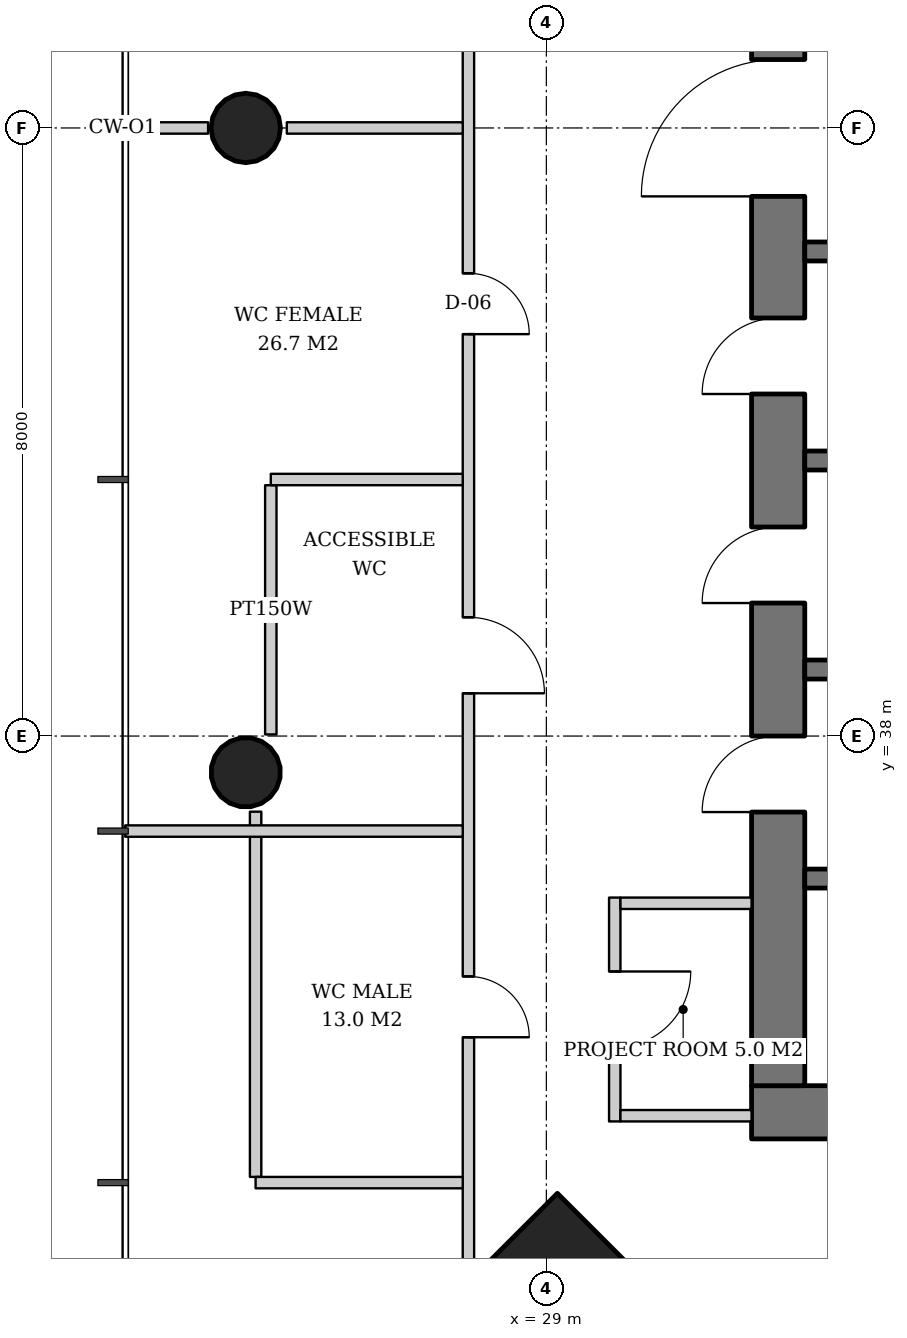
"""IFC4 building model, lengths in metres.
Left out: names, types, materials, properties, quantities, classifications, styles, units other than length and angle.
Written with IfcOpenShell. Run it as: python <this file> out.ifc"""

import sys

from ifc_helpers import new_model, si_unit, direction, frame, frame_2d, origin, origin_2d, place, context, subcontext, project, spatial, rectangle, hollow_circle, extrude, element, fill, save


model = new_model("IFC4")
c1 = context("Model", 3, precision=1e-05, world=origin(), true_north=direction((0.0, 1.0)))
c2 = subcontext(c1, "Body", "Model", "MODEL_VIEW")
j1 = project(units=[si_unit("LENGTHUNIT", "METRE"), si_unit("PLANEANGLEUNIT", "RADIAN")], contexts=[c1])
p1 = place(None, origin())
s1 = spatial("IfcSite", under=j1, at=p1, CompositionType="ELEMENT")
p2 = place(p1, origin())
s2 = spatial("IfcBuilding", under=s1, at=p2, CompositionType="ELEMENT")
p3 = place(p2, frame((0.0, 0.0, 146.4)))
s3 = spatial("IfcBuildingStorey", under=s2, at=p3, CompositionType="ELEMENT", Elevation=146.4)
p4 = place(p3, frame((29.107, 30.107, 0.0), z_axis=(0.031898107953, 0.031898107953, 0.998981992539), x_axis=(-0.707106781187, 0.707106781187, 0.0)))
e1 = element("IfcColumn", 1, at=p4, inside=s3, PredefinedType="COLUMN", context=c2, shape_type="SweptSolid", body=[
    extrude(rectangle(XDim=2.6, YDim=2.6, at=origin_2d()), origin(), (0.0, 0.0, 1.0), 3.804),
])
p5 = place(p3, frame((25.007, 46.0, 0.0), z_axis=(0.031978496719, 0.0, 0.999488557087), x_axis=(0.0, 1.0, 0.0)))
e2 = element("IfcColumn", 2, at=p5, inside=s3, PredefinedType="COLUMN", context=c2, shape_type="SweptSolid", body=[
    extrude(hollow_circle(Radius=0.457, WallThickness=0.03, at=origin_2d()), origin(), (0.0, 0.0, 1.0), 3.802),
])
p6 = place(p3, frame((25.007, 37.504, 0.0), z_axis=(0.031974442509, 0.015923015547, 0.999361842679), x_axis=(-0.445775033553, 0.895145027055, 0.0)))
e3 = element("IfcColumn", 3, at=p6, inside=s3, PredefinedType="COLUMN", context=c2, shape_type="SweptSolid", body=[
    extrude(hollow_circle(Radius=0.457, WallThickness=0.03, at=origin_2d()), origin(), (0.0, 0.0, 1.0), 3.802),
])
p7 = place(p3, frame((31.7, 33.05, 0.0), z_axis=(0.0, 0.0, 1.0), x_axis=(1.0, 0.0, 0.0)))
e4 = element("IfcWall", 4, at=p7, inside=s3, PredefinedType="SHEAR", context=c2, shape_type="SweptSolid", body=[
    extrude(rectangle(XDim=26.6, YDim=0.7, at=frame_2d((13.3, 0.0))), origin(), (0.0, 0.0, 1.0), 3.8),
])
p8 = place(p7, frame((7.3, 0.0, 0.0)))
e5 = element("IfcOpeningElement", 5, at=p8, cuts=e4, PredefinedType="OPENING", context=c2, shape_type="SweptSolid", body=[
    extrude(rectangle(XDim=1.0, YDim=2.1, at=frame_2d((0.5, 1.05))), frame((0.0, 0.36, 0.0), z_axis=(0.0, -1.0, 0.0), x_axis=(1.0, 0.0, 0.0)), (0.0, 0.0, 1.0), 0.72),
])
p9 = place(p7, frame((18.75, 0.0, 0.0)))
e6 = element("IfcOpeningElement", 6, at=p9, cuts=e4, PredefinedType="OPENING", context=c2, shape_type="SweptSolid", body=[
    extrude(rectangle(XDim=1.0, YDim=2.1, at=frame_2d((0.5, 1.05))), frame((0.0, 0.36, 0.0), z_axis=(0.0, -1.0, 0.0), x_axis=(1.0, 0.0, 0.0)), (0.0, 0.0, 1.0), 0.72),
])
p10 = place(p7, frame((3.2, 0.0, 0.0)))
e7 = element("IfcOpeningElement", 7, at=p10, cuts=e4, PredefinedType="OPENING", context=c2, shape_type="SweptSolid", body=[
    extrude(rectangle(XDim=1.0, YDim=2.1, at=frame_2d((0.5, 1.05))), frame((0.0, 0.36, 0.0), z_axis=(0.0, -1.0, 0.0), x_axis=(1.0, 0.0, 0.0)), (0.0, 0.0, 1.0), 0.72),
])
p11 = place(p7, frame((10.42, 0.0, 0.0)))
e8 = element("IfcOpeningElement", 8, at=p11, cuts=e4, PredefinedType="OPENING", context=c2, shape_type="SweptSolid", body=[
    extrude(rectangle(XDim=1.0, YDim=2.1, at=frame_2d((0.5, 1.05))), frame((0.0, 0.36, 0.0), z_axis=(0.0, -1.0, 0.0), x_axis=(1.0, 0.0, 0.0)), (0.0, 0.0, 1.0), 0.72),
])
p12 = place(p7, frame((14.46, 0.0, 0.0)))
e9 = element("IfcOpeningElement", 9, at=p12, cuts=e4, PredefinedType="OPENING", context=c2, shape_type="SweptSolid", body=[
    extrude(rectangle(XDim=1.0, YDim=2.1, at=frame_2d((0.5, 1.05))), frame((0.0, 0.36, 0.0), z_axis=(0.0, -1.0, 0.0), x_axis=(1.0, 0.0, 0.0)), (0.0, 0.0, 1.0), 0.72),
])
p13 = place(p7, frame((22.5, 0.0, 0.0)))
e10 = element("IfcOpeningElement", 10, at=p13, cuts=e4, PredefinedType="OPENING", context=c2, shape_type="SweptSolid", body=[
    extrude(rectangle(XDim=1.0, YDim=2.1, at=frame_2d((0.5, 1.05))), frame((0.0, 0.36, 0.0), z_axis=(0.0, -1.0, 0.0), x_axis=(1.0, 0.0, 0.0)), (0.0, 0.0, 1.0), 0.72),
])
p14 = place(p3, frame((32.05, 33.4, 0.0), z_axis=(0.0, 0.0, 1.0), x_axis=(0.0, 1.0, 0.0)))
e11 = element("IfcWall", 11, at=p14, inside=s3, PredefinedType="SHEAR", context=c2, shape_type="SweptSolid", body=[
    extrude(rectangle(XDim=25.2, YDim=0.7, at=frame_2d((12.6, 0.0))), origin(), (0.0, 0.0, 1.0), 3.8),
])
p15 = place(p14, frame((11.7, 0.0, 0.0)))
e12 = element("IfcOpeningElement", 12, at=p15, cuts=e11, PredefinedType="OPENING", context=c2, shape_type="SweptSolid", body=[
    extrude(rectangle(XDim=1.8, YDim=2.4, at=frame_2d((0.9, 1.2))), frame((0.0, 0.36, 0.0), z_axis=(0.0, -1.0, 0.0), x_axis=(1.0, 0.0, 0.0)), (0.0, 0.0, 1.0), 0.72),
])
p16 = place(p14, frame((3.6, 0.0, 0.0)))
e13 = element("IfcOpeningElement", 13, at=p16, cuts=e11, PredefinedType="OPENING", context=c2, shape_type="SweptSolid", body=[
    extrude(rectangle(XDim=1.0, YDim=2.1, at=frame_2d((0.5, 1.05))), frame((0.0, 0.36, 0.0), z_axis=(0.0, -1.0, 0.0), x_axis=(1.0, 0.0, 0.0)), (0.0, 0.0, 1.0), 0.72),
])
p17 = place(p14, frame((6.35, 0.0, 0.0)))
e14 = element("IfcOpeningElement", 14, at=p17, cuts=e11, PredefinedType="OPENING", context=c2, shape_type="SweptSolid", body=[
    extrude(rectangle(XDim=1.0, YDim=2.1, at=frame_2d((0.5, 1.05))), frame((0.0, 0.36, 0.0), z_axis=(0.0, -1.0, 0.0), x_axis=(1.0, 0.0, 0.0)), (0.0, 0.0, 1.0), 0.72),
])
p18 = place(p14, frame((9.1, 0.0, 0.0)))
e15 = element("IfcOpeningElement", 15, at=p18, cuts=e11, PredefinedType="OPENING", context=c2, shape_type="SweptSolid", body=[
    extrude(rectangle(XDim=1.0, YDim=2.1, at=frame_2d((0.5, 1.05))), frame((0.0, 0.36, 0.0), z_axis=(0.0, -1.0, 0.0), x_axis=(1.0, 0.0, 0.0)), (0.0, 0.0, 1.0), 0.72),
])
p19 = place(p14, frame((15.1, 0.0, 0.0)))
e16 = element("IfcOpeningElement", 16, at=p19, cuts=e11, PredefinedType="OPENING", context=c2, shape_type="SweptSolid", body=[
    extrude(rectangle(XDim=1.0, YDim=2.1, at=frame_2d((0.5, 1.05))), frame((0.0, 0.36, 0.0), z_axis=(0.0, -1.0, 0.0), x_axis=(1.0, 0.0, 0.0)), (0.0, 0.0, 1.0), 0.72),
])
p20 = place(p14, frame((17.85, 0.0, 0.0)))
e17 = element("IfcOpeningElement", 17, at=p20, cuts=e11, PredefinedType="OPENING", context=c2, shape_type="SweptSolid", body=[
    extrude(rectangle(XDim=1.0, YDim=2.1, at=frame_2d((0.5, 1.05))), frame((0.0, 0.36, 0.0), z_axis=(0.0, -1.0, 0.0), x_axis=(1.0, 0.0, 0.0)), (0.0, 0.0, 1.0), 0.72),
])
for number, where, z_axis, x_axis in (
    (18, (32.4, 36.125, 0.0), (0.0, 0.0, 1.0), (1.0, 0.0, 0.0)),
    (19, (32.4, 38.875, 0.0), (0.0, 0.0, 1.0), (1.0, 0.0, 0.0)),
    (20, (32.4, 41.625, 0.0), (0.0, 0.0, 1.0), (1.0, 0.0, 0.0)),
    (21, (32.4, 44.375, 0.0), (0.0, 0.0, 1.0), (1.0, 0.0, 0.0)),
):
    element("IfcWall", number, at=place(p3, frame(where, z_axis=z_axis, x_axis=x_axis)), inside=s3, PredefinedType="SHEAR", context=c2, shape_type="SweptSolid", body=[
        extrude(rectangle(XDim=2.7, YDim=0.25, at=frame_2d((1.35, 0.0))), origin(), (0.0, 0.0, 1.0), 3.8),
    ])
p21 = place(p3, frame((29.9, 35.875, 0.0), z_axis=(0.0, 0.0, 1.0), x_axis=(0.0, -1.0, 0.0)))
e22 = element("IfcWall", 22, at=p21, inside=s3, PredefinedType="PARTITIONING", context=c2, shape_type="SweptSolid", body=[
    extrude(rectangle(XDim=2.945, YDim=0.15, at=frame_2d((1.473, 0.0))), origin(), (0.0, 0.0, 1.0), 2.806),
])
p22 = place(p21, frame((0.972, 0.0, 0.0)))
e23 = element("IfcOpeningElement", 23, at=p22, cuts=e22, PredefinedType="OPENING", context=c2, shape_type="SweptSolid", body=[
    extrude(rectangle(XDim=1.0, YDim=2.1, at=frame_2d((0.5, 1.05))), frame((0.0, 0.085, 0.0), z_axis=(0.0, -1.0, 0.0), x_axis=(1.0, 0.0, 0.0)), (0.0, 0.0, 1.0), 0.17),
])
for number, where, z_axis, x_axis in (
    (24, (31.7, 35.8, 0.0), (0.0, 0.0, 1.0), (-1.0, 0.0, 0.0)),
    (25, (31.7, 33.005, 0.0), (0.0, 0.0, 1.0), (-1.0, 0.0, 0.0)),
):
    element("IfcWall", number, at=place(p3, frame(where, z_axis=z_axis, x_axis=x_axis)), inside=s3, PredefinedType="PARTITIONING", context=c2, shape_type="SweptSolid", body=[
        extrude(rectangle(XDim=1.725, YDim=0.15, at=frame_2d((0.862, 0.0))), origin(), (0.0, 0.0, 1.0), 3.62),
    ])
p23 = place(p3, frame((25.375, 41.3, 0.0), z_axis=(0.0, 0.0, 1.0), x_axis=(0.0, -1.0, 0.0)))
e26 = element("IfcWall", 26, at=p23, inside=s3, PredefinedType="PARTITIONING", context=c2, shape_type="SweptSolid", body=[
    extrude(rectangle(XDim=3.279, YDim=0.15, at=frame_2d((1.639, 0.0))), origin(), (0.0, 0.0, 1.0), 2.806),
])
p24 = place(p3, frame((25.175, 37.005, 0.0), z_axis=(0.0, 0.0, 1.0), x_axis=(0.0, -1.0, 0.0)))
e27 = element("IfcWall", 27, at=p24, inside=s3, PredefinedType="PARTITIONING", context=c2, shape_type="SweptSolid", body=[
    extrude(rectangle(XDim=4.805, YDim=0.15, at=frame_2d((2.402, 0.0))), origin(), (0.0, 0.0, 1.0), 2.806),
])
p25 = place(p3, frame((27.975, 61.112, 0.0), z_axis=(0.0, 0.0, 1.0), x_axis=(0.0, -1.0, 0.0)))
e28 = element("IfcWall", 28, at=p25, inside=s3, PredefinedType="PARTITIONING", context=c2, shape_type="SweptSolid", body=[
    extrude(rectangle(XDim=30.223, YDim=0.15, at=frame_2d((15.112, 0.0))), origin(), (0.0, 0.0, 1.0), 2.72),
])
p26 = place(p25, frame((3.049, 0.0, 0.0)))
e29 = element("IfcOpeningElement", 29, at=p26, cuts=e28, PredefinedType="OPENING", context=c2, shape_type="SweptSolid", body=[
    extrude(rectangle(XDim=1.0, YDim=2.1, at=frame_2d((0.5, 1.05))), frame((0.0, 0.085, 0.0), z_axis=(0.0, -1.0, 0.0), x_axis=(1.0, 0.0, 0.0)), (0.0, 0.0, 1.0), 0.17),
])
p27 = place(p25, frame((7.674, 0.0, 0.0)))
e30 = element("IfcOpeningElement", 30, at=p27, cuts=e28, PredefinedType="OPENING", context=c2, shape_type="SweptSolid", body=[
    extrude(rectangle(XDim=1.0, YDim=2.1, at=frame_2d((0.5, 1.05))), frame((0.0, 0.085, 0.0), z_axis=(0.0, -1.0, 0.0), x_axis=(1.0, 0.0, 0.0)), (0.0, 0.0, 1.0), 0.17),
])
p28 = place(p25, frame((12.299, 0.0, 0.0)))
e31 = element("IfcOpeningElement", 31, at=p28, cuts=e28, PredefinedType="OPENING", context=c2, shape_type="SweptSolid", body=[
    extrude(rectangle(XDim=1.0, YDim=2.1, at=frame_2d((0.5, 1.05))), frame((0.0, 0.085, 0.0), z_axis=(0.0, -1.0, 0.0), x_axis=(1.0, 0.0, 0.0)), (0.0, 0.0, 1.0), 0.17),
])
p29 = place(p25, frame((17.024, 0.0, 0.0)))
e32 = element("IfcOpeningElement", 32, at=p29, cuts=e28, PredefinedType="OPENING", context=c2, shape_type="SweptSolid", body=[
    extrude(rectangle(XDim=0.8, YDim=2.1, at=frame_2d((0.4, 1.05))), frame((0.0, 0.085, 0.0), z_axis=(0.0, -1.0, 0.0), x_axis=(1.0, 0.0, 0.0)), (0.0, 0.0, 1.0), 0.17),
])
p30 = place(p25, frame((21.549, 0.0, 0.0)))
e33 = element("IfcOpeningElement", 33, at=p30, cuts=e28, PredefinedType="OPENING", context=c2, shape_type="SweptSolid", body=[
    extrude(rectangle(XDim=1.0, YDim=2.1, at=frame_2d((0.5, 1.05))), frame((0.0, 0.085, 0.0), z_axis=(0.0, -1.0, 0.0), x_axis=(1.0, 0.0, 0.0)), (0.0, 0.0, 1.0), 0.17),
])
p31 = place(p25, frame((26.274, 0.0, 0.0)))
e34 = element("IfcOpeningElement", 34, at=p31, cuts=e28, PredefinedType="OPENING", context=c2, shape_type="SweptSolid", body=[
    extrude(rectangle(XDim=0.8, YDim=2.1, at=frame_2d((0.4, 1.05))), frame((0.0, 0.085, 0.0), z_axis=(0.0, -1.0, 0.0), x_axis=(1.0, 0.0, 0.0)), (0.0, 0.0, 1.0), 0.17),
])
p32 = place(p3, frame((27.9, 46.0, 0.0), z_axis=(0.0, 0.0, 1.0), x_axis=(-1.0, 0.0, 0.0)))
e35 = element("IfcWall", 35, at=p32, inside=s3, PredefinedType="PARTITIONING", context=c2, shape_type="SweptSolid", body=[
    extrude(rectangle(XDim=2.314, YDim=0.15, at=frame_2d((1.157, 0.0))), origin(), (0.0, 0.0, 1.0), 3.62),
])
p33 = place(p3, frame((24.55, 46.0, 0.0), z_axis=(0.0, 0.0, 1.0), x_axis=(-1.0, 0.0, 0.0)))
e36 = element("IfcWall", 36, at=p33, inside=s3, PredefinedType="PARTITIONING", context=c2, shape_type="SweptSolid", body=[
    extrude(rectangle(XDim=1.09, YDim=0.15, at=frame_2d((0.545, 0.0))), origin(), (0.0, 0.0, 1.0), 3.62),
])
p34 = place(p3, frame((27.9, 41.375, 0.0), z_axis=(0.0, 0.0, 1.0), x_axis=(-1.0, 0.0, 0.0)))
e37 = element("IfcWall", 37, at=p34, inside=s3, PredefinedType="PARTITIONING", context=c2, shape_type="SweptSolid", body=[
    extrude(rectangle(XDim=2.525, YDim=0.15, at=frame_2d((1.262, 0.0))), origin(), (0.0, 0.0, 1.0), 3.62),
])
p35 = place(p3, frame((27.9, 36.75, 0.0), z_axis=(0.0, 0.0, 1.0), x_axis=(-1.0, 0.0, 0.0)))
e38 = element("IfcWall", 38, at=p35, inside=s3, PredefinedType="PARTITIONING", context=c2, shape_type="SweptSolid", body=[
    extrude(rectangle(XDim=4.44, YDim=0.15, at=frame_2d((2.22, 0.0))), origin(), (0.0, 0.0, 1.0), 2.82),
])
p36 = place(p3, frame((27.9, 32.125, 0.0), z_axis=(0.0, 0.0, 1.0), x_axis=(-1.0, 0.0, 0.0)))
e39 = element("IfcWall", 39, at=p36, inside=s3, PredefinedType="PARTITIONING", context=c2, shape_type="SweptSolid", body=[
    extrude(rectangle(XDim=2.725, YDim=0.15, at=frame_2d((1.362, 0.0))), origin(), (0.0, 0.0, 1.0), 2.82),
])
p37 = place(p15, origin())
e40 = element("IfcDoor", 40, at=p37, inside=s3, OperationType="DOUBLE_DOOR_SINGLE_SWING", PredefinedType="DOOR", context=c2, shape_type="SweptSolid", body=[
    extrude(rectangle(XDim=1.8, YDim=2.4, at=frame_2d((0.9, 1.2))), frame((0.0, 0.025, 0.0), z_axis=(0.0, -1.0, 0.0), x_axis=(1.0, 0.0, 0.0)), (0.0, 0.0, 1.0), 0.05),
])
fill(e12, e40)
p38 = place(p16, origin())
e41 = element("IfcDoor", 41, at=p38, inside=s3, OperationType="SINGLE_SWING_LEFT", PredefinedType="DOOR", context=c2, shape_type="SweptSolid", body=[
    extrude(rectangle(XDim=1.0, YDim=2.1, at=frame_2d((0.5, 1.05))), frame((0.0, -0.29, 0.0), z_axis=(0.0, -1.0, 0.0), x_axis=(1.0, 0.0, 0.0)), (0.0, 0.0, 1.0), 0.05),
])
fill(e13, e41)
p39 = place(p17, origin())
e42 = element("IfcDoor", 42, at=p39, inside=s3, OperationType="SINGLE_SWING_LEFT", PredefinedType="DOOR", context=c2, shape_type="SweptSolid", body=[
    extrude(rectangle(XDim=1.0, YDim=2.1, at=frame_2d((0.5, 1.05))), frame((0.0, -0.29, 0.0), z_axis=(0.0, -1.0, 0.0), x_axis=(1.0, 0.0, 0.0)), (0.0, 0.0, 1.0), 0.05),
])
fill(e14, e42)
p40 = place(p18, origin())
e43 = element("IfcDoor", 43, at=p40, inside=s3, OperationType="SINGLE_SWING_LEFT", PredefinedType="DOOR", context=c2, shape_type="SweptSolid", body=[
    extrude(rectangle(XDim=1.0, YDim=2.1, at=frame_2d((0.5, 1.05))), frame((0.0, -0.29, 0.0), z_axis=(0.0, -1.0, 0.0), x_axis=(1.0, 0.0, 0.0)), (0.0, 0.0, 1.0), 0.05),
])
fill(e15, e43)
p41 = place(p22, origin())
e44 = element("IfcDoor", 44, at=p41, inside=s3, OperationType="SINGLE_SWING_LEFT", PredefinedType="DOOR", context=c2, shape_type="SweptSolid", body=[
    extrude(rectangle(XDim=1.0, YDim=2.1, at=frame_2d((0.5, 1.05))), frame((0.0, 0.025, 0.0), z_axis=(0.0, -1.0, 0.0), x_axis=(1.0, 0.0, 0.0)), (0.0, 0.0, 1.0), 0.05),
])
fill(e23, e44)
p42 = place(p29, origin())
e45 = element("IfcDoor", 45, at=p42, inside=s3, OperationType="SINGLE_SWING_RIGHT", PredefinedType="DOOR", context=c2, shape_type="SweptSolid", body=[
    extrude(rectangle(XDim=0.8, YDim=2.1, at=frame_2d((0.4, 1.05))), frame((0.0, 0.025, 0.0), z_axis=(0.0, -1.0, 0.0), x_axis=(1.0, 0.0, 0.0)), (0.0, 0.0, 1.0), 0.05),
])
fill(e32, e45)
p43 = place(p30, origin())
e46 = element("IfcDoor", 46, at=p43, inside=s3, OperationType="SINGLE_SWING_RIGHT", PredefinedType="DOOR", context=c2, shape_type="SweptSolid", body=[
    extrude(rectangle(XDim=1.0, YDim=2.1, at=frame_2d((0.5, 1.05))), frame((0.0, 0.025, 0.0), z_axis=(0.0, -1.0, 0.0), x_axis=(1.0, 0.0, 0.0)), (0.0, 0.0, 1.0), 0.05),
])
fill(e33, e46)
p44 = place(p31, origin())
e47 = element("IfcDoor", 47, at=p44, inside=s3, OperationType="SINGLE_SWING_RIGHT", PredefinedType="DOOR", context=c2, shape_type="SweptSolid", body=[
    extrude(rectangle(XDim=0.8, YDim=2.1, at=frame_2d((0.4, 1.05))), frame((0.0, 0.025, 0.0), z_axis=(0.0, -1.0, 0.0), x_axis=(1.0, 0.0, 0.0)), (0.0, 0.0, 1.0), 0.05),
])
fill(e34, e47)
save(model, sys.argv[1])
